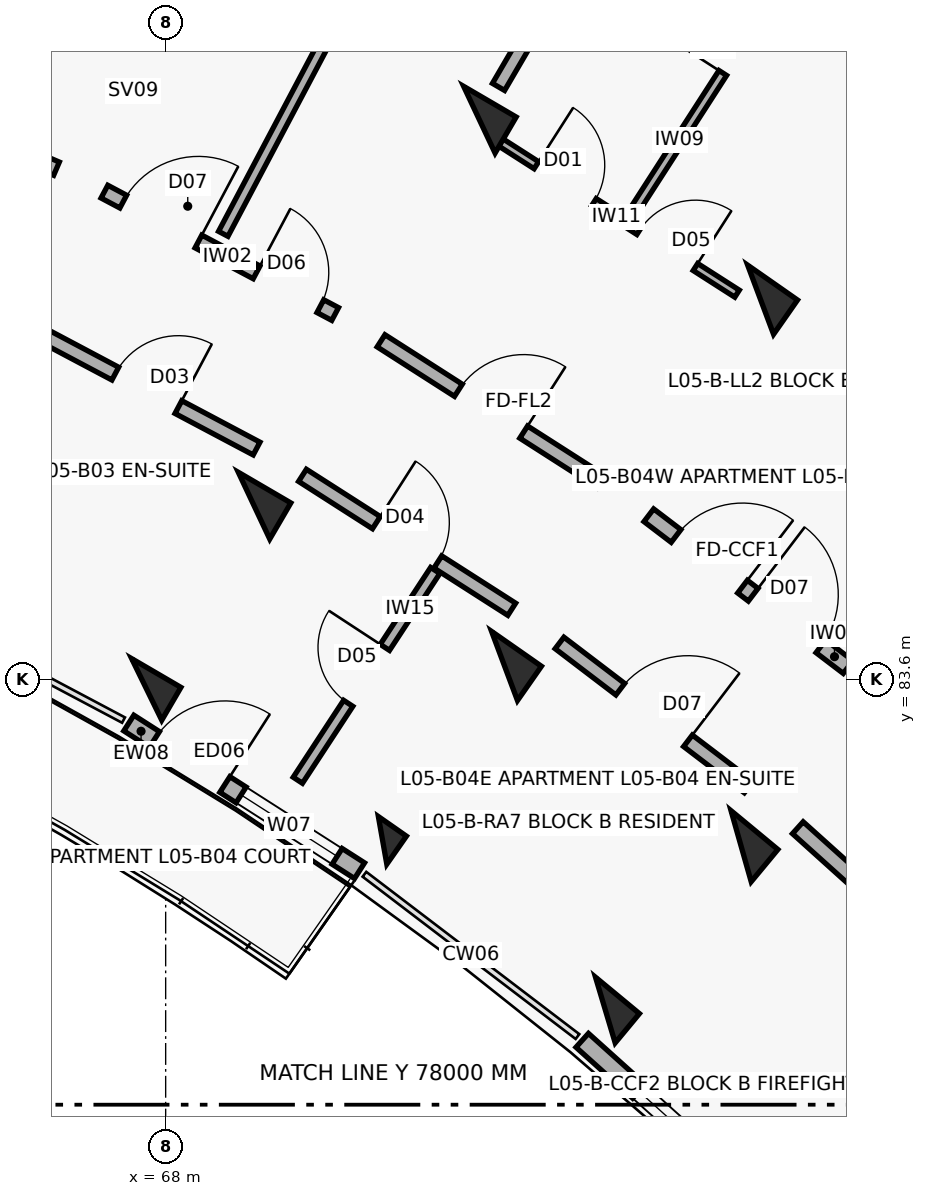
"""IFC4 building model, lengths in metres.
Left out: names, types, materials, properties, quantities, classifications, styles, units other than length and angle.
Written with IfcOpenShell. Run it as: python <this file> out.ifc"""

import sys

from ifc_helpers import new_model, si_unit, direction, frame, frame_2d, origin, origin_2d, place, context, subcontext, project, spatial, rectangle, extrude, element, fill, save


model = new_model("IFC4")
c1 = context("Model", 3, precision=1e-05, world=origin(), true_north=direction((0.0, 1.0)))
c2 = subcontext(c1, "Body", "Model", "MODEL_VIEW")
j1 = project(units=[si_unit("LENGTHUNIT", "METRE"), si_unit("PLANEANGLEUNIT", "RADIAN")], contexts=[c1])
p1 = place(None, origin())
s1 = spatial("IfcSite", under=j1, at=p1, CompositionType="ELEMENT")
p2 = place(p1, origin())
s2 = spatial("IfcBuilding", under=s1, at=p2, CompositionType="ELEMENT")
p3 = place(p2, frame((0.0, 0.0, 17.4)))
s3 = spatial("IfcBuildingStorey", under=s2, at=p3, CompositionType="ELEMENT", Elevation=17.4)
p4 = place(p3, frame((67.751, 83.464, 0.0), z_axis=(0.0, 0.0, 1.0), x_axis=(0.504226211181, 0.863571611366, 0.0)))
e1 = element("IfcColumn", 1, at=p4, inside=s3, PredefinedType="COLUMN", context=c2, shape_type="SweptSolid", body=[
    extrude(rectangle(XDim=0.5, YDim=0.75, at=origin_2d()), origin(), (0.0, 0.0, 1.0), 3.1),
])
for number, where, z_axis, x_axis in (
    (2, (69.163, 85.882, 0.0), (0.0, 0.0, 1.0), (0.504, 0.864, 0.0)),
    (3, (72.127, 90.96, 0.0), (0.0, 0.0, 1.0), (0.504, 0.864, 0.0)),
):
    element("IfcColumn", number, at=place(p3, frame(where, z_axis=z_axis, x_axis=x_axis)), inside=s3, PredefinedType="COLUMN", context=c2, shape_type="SweptSolid", body=[
        extrude(rectangle(XDim=0.55, YDim=0.8, at=origin_2d()), origin(), (0.0, 0.0, 1.0), 3.1),
    ])
p5 = place(p3, frame((70.854, 81.478, 0.0), z_axis=(0.0, 0.0, 1.0), x_axis=(0.573004420611, 0.819552276527, 0.0)))
e4 = element("IfcColumn", 4, at=p5, inside=s3, PredefinedType="COLUMN", context=c2, shape_type="SweptSolid", body=[
    extrude(rectangle(XDim=0.45, YDim=0.45, at=origin_2d()), origin(), (0.0, 0.0, 1.0), 3.1),
])
for number, where, z_axis, x_axis in (
    (5, (72.458, 83.773, 0.0), (0.0, 0.0, 1.0), (0.573, 0.82, 0.0)),
    (6, (75.828, 88.592, 0.0), (0.0, 0.0, 1.0), (0.573, 0.82, 0.0)),
):
    element("IfcColumn", number, at=place(p3, frame(where, z_axis=z_axis, x_axis=x_axis)), inside=s3, PredefinedType="COLUMN", context=c2, shape_type="SweptSolid", body=[
        extrude(rectangle(XDim=0.55, YDim=0.8, at=origin_2d()), origin(), (0.0, 0.0, 1.0), 3.1),
    ])
p6 = place(p3, frame((73.785, 79.245, 0.0), z_axis=(0.0, 0.0, 1.0), x_axis=(0.637961754089, 0.770068049148, 0.0)))
e7 = element("IfcColumn", 7, at=p6, inside=s3, PredefinedType="COLUMN", context=c2, shape_type="SweptSolid", body=[
    extrude(rectangle(XDim=0.5, YDim=0.75, at=origin_2d()), origin(), (0.0, 0.0, 1.0), 3.1),
])
p7 = place(p3, frame((75.571, 81.402, 0.0), z_axis=(0.0, 0.0, 1.0), x_axis=(0.637961754089, 0.770068049148, 0.0)))
e8 = element("IfcColumn", 8, at=p7, inside=s3, PredefinedType="COLUMN", context=c2, shape_type="SweptSolid", body=[
    extrude(rectangle(XDim=0.55, YDim=0.8, at=origin_2d()), origin(), (0.0, 0.0, 1.0), 3.1),
])
p8 = place(p3, frame((67.515, 83.022, 0.0), z_axis=(0.0, 0.0, 1.0), x_axis=(0.84225540507, -0.539078688718, 0.0)))
e9 = element("IfcWall", 9, at=p8, inside=s3, PredefinedType="SOLIDWALL", context=c2, shape_type="SweptSolid", body=[
    extrude(rectangle(XDim=3.604, YDim=0.245, at=frame_2d((1.802, 0.0))), origin(), (0.0, 0.0, 1.0), 2.25),
])
p9 = place(p8, frame((0.4, 0.0, 0.0)))
e10 = element("IfcOpeningElement", 10, at=p9, cuts=e9, PredefinedType="OPENING", context=c2, shape_type="SweptSolid", body=[
    extrude(rectangle(XDim=1.1, YDim=2.15, at=frame_2d((0.55, 1.075))), frame((0.0, 0.133, 0.0), z_axis=(0.0, -1.0, 0.0), x_axis=(1.0, 0.0, 0.0)), (0.0, 0.0, 1.0), 0.265),
])
p10 = place(p8, frame((1.754, 0.0, 0.35)))
e11 = element("IfcOpeningElement", 11, at=p10, cuts=e9, PredefinedType="OPENING", context=c2, shape_type="SweptSolid", body=[
    extrude(rectangle(XDim=1.5, YDim=1.65, at=frame_2d((0.75, 0.825))), frame((0.0, 0.133, 0.0), z_axis=(0.0, -1.0, 0.0), x_axis=(1.0, 0.0, 0.0)), (0.0, 0.0, 1.0), 0.265),
])
p11 = place(p3, frame((73.481, 78.847, 0.0), z_axis=(0.0, 0.0, 1.0), x_axis=(0.743385092197, -0.668863666751, 0.0)))
e12 = element("IfcWall", 12, at=p11, inside=s3, PredefinedType="SOLIDWALL", context=c2, shape_type="SweptSolid", body=[
    extrude(rectangle(XDim=3.604, YDim=0.245, at=frame_2d((1.802, 0.0))), origin(), (0.0, 0.0, 1.0), 2.25),
])
p12 = place(p11, frame((1.002, 0.0, 0.32)))
e13 = element("IfcOpeningElement", 13, at=p12, cuts=e12, PredefinedType="OPENING", context=c2, shape_type="SweptSolid", body=[
    extrude(rectangle(XDim=1.6, YDim=1.5, at=frame_2d((0.8, 0.75))), frame((0.0, 0.133, 0.0), z_axis=(0.0, -1.0, 0.0), x_axis=(1.0, 0.0, 0.0)), (0.0, 0.0, 1.0), 0.265),
])
p13 = place(p3, frame((63.407, 91.673, 0.0), z_axis=(0.0, 0.0, 1.0), x_axis=(0.918718172399, -0.394913813008, 0.0)))
e14 = element("IfcWall", 14, at=p13, inside=s3, PredefinedType="SOLIDWALL", context=c2, shape_type="SweptSolid", body=[
    extrude(rectangle(XDim=3.436, YDim=0.19, at=frame_2d((1.718, 0.0))), origin(), (0.0, 0.0, 1.0), 2.08),
])
p14 = place(p13, frame((1.208, 0.0, 0.0)))
e15 = element("IfcOpeningElement", 15, at=p14, cuts=e14, PredefinedType="OPENING", context=c2, shape_type="SweptSolid", body=[
    extrude(rectangle(XDim=1.02, YDim=2.15, at=frame_2d((0.51, 1.075))), frame((0.0, 0.105, 0.0), z_axis=(0.0, -1.0, 0.0), x_axis=(1.0, 0.0, 0.0)), (0.0, 0.0, 1.0), 0.21),
])
p15 = place(p3, frame((67.194, 90.014, 0.0), z_axis=(0.0, 0.0, 1.0), x_axis=(0.883410853063, -0.468599258099, 0.0)))
e16 = element("IfcWall", 16, at=p15, inside=s3, PredefinedType="SOLIDWALL", context=c2, shape_type="SweptSolid", body=[
    extrude(rectangle(XDim=3.436, YDim=0.19, at=frame_2d((1.718, 0.0))), origin(), (0.0, 0.0, 1.0), 2.08),
])
p16 = place(p15, frame((0.28, 0.0, 0.0)))
e17 = element("IfcOpeningElement", 17, at=p16, cuts=e16, PredefinedType="OPENING", context=c2, shape_type="SweptSolid", body=[
    extrude(rectangle(XDim=1.12, YDim=2.15, at=frame_2d((0.56, 1.075))), frame((0.0, 0.105, 0.0), z_axis=(0.0, -1.0, 0.0), x_axis=(1.0, 0.0, 0.0)), (0.0, 0.0, 1.0), 0.21),
])
p17 = place(p15, frame((2.266, 0.0, 0.0)))
e18 = element("IfcOpeningElement", 18, at=p17, cuts=e16, PredefinedType="OPENING", context=c2, shape_type="SweptSolid", body=[
    extrude(rectangle(XDim=0.95, YDim=2.1, at=frame_2d((0.475, 1.05))), frame((0.0, 0.105, 0.0), z_axis=(0.0, -1.0, 0.0), x_axis=(1.0, 0.0, 0.0)), (0.0, 0.0, 1.0), 0.21),
])
p18 = place(p3, frame((66.309, 88.165, 0.0), z_axis=(0.0, 0.0, 1.0), x_axis=(0.883444301944, -0.468536194293, 0.0)))
e19 = element("IfcWall", 19, at=p18, inside=s3, PredefinedType="SOLIDWALL", context=c2, shape_type="SweptSolid", body=[
    extrude(rectangle(XDim=3.269, YDim=0.19, at=frame_2d((1.634, 0.0))), origin(), (0.0, 0.0, 1.0), 2.08),
])
p19 = place(p18, frame((1.164, 0.0, 0.0)))
e20 = element("IfcOpeningElement", 20, at=p19, cuts=e19, PredefinedType="OPENING", context=c2, shape_type="SweptSolid", body=[
    extrude(rectangle(XDim=0.94, YDim=2.1, at=frame_2d((0.47, 1.05))), frame((0.0, 0.105, 0.0), z_axis=(0.0, -1.0, 0.0), x_axis=(1.0, 0.0, 0.0)), (0.0, 0.0, 1.0), 0.21),
])
p20 = place(p3, frame((68.758, 89.459, 0.0), z_axis=(0.0, 0.0, 1.0), x_axis=(0.467208910392, 0.884146952746, 0.0)))
e21 = element("IfcWall", 21, at=p20, inside=s3, PredefinedType="PARTITIONING", context=c2, shape_type="SweptSolid", body=[
    extrude(rectangle(XDim=7.95, YDim=0.14, at=frame_2d((3.975, 0.0))), origin(), (0.0, 0.0, 1.0), 2.08),
])
p21 = place(p20, frame((6.05, 0.0, 0.0)))
e22 = element("IfcOpeningElement", 22, at=p21, cuts=e21, PredefinedType="OPENING", context=c2, shape_type="SweptSolid", body=[
    extrude(rectangle(XDim=0.92, YDim=2.1, at=frame_2d((0.46, 1.05))), frame((0.0, 0.08, 0.0), z_axis=(0.0, -1.0, 0.0), x_axis=(1.0, 0.0, 0.0)), (0.0, 0.0, 1.0), 0.16),
])
p22 = place(p3, frame((70.834, 88.051, 0.0), z_axis=(0.0, 0.0, 1.0), x_axis=(0.842257205985, -0.539075874963, 0.0)))
e23 = element("IfcWall", 23, at=p22, inside=s3, PredefinedType="SOLIDWALL", context=c2, shape_type="SweptSolid", body=[
    extrude(rectangle(XDim=3.436, YDim=0.19, at=frame_2d((1.718, 0.0))), origin(), (0.0, 0.0, 1.0), 2.08),
])
p23 = place(p22, frame((1.208, 0.0, 0.0)))
e24 = element("IfcOpeningElement", 24, at=p23, cuts=e23, PredefinedType="OPENING", context=c2, shape_type="SweptSolid", body=[
    extrude(rectangle(XDim=1.02, YDim=2.15, at=frame_2d((0.51, 1.075))), frame((0.0, 0.105, 0.0), z_axis=(0.0, -1.0, 0.0), x_axis=(1.0, 0.0, 0.0)), (0.0, 0.0, 1.0), 0.21),
])
p24 = place(p3, frame((69.8, 86.281, 0.0), z_axis=(0.0, 0.0, 1.0), x_axis=(0.842225276846, -0.539125758095, 0.0)))
e25 = element("IfcWall", 25, at=p24, inside=s3, PredefinedType="SOLIDWALL", context=c2, shape_type="SweptSolid", body=[
    extrude(rectangle(XDim=3.269, YDim=0.19, at=frame_2d((1.634, 0.0))), origin(), (0.0, 0.0, 1.0), 2.08),
])
p25 = place(p24, frame((1.154, 0.0, 0.0)))
e26 = element("IfcOpeningElement", 26, at=p25, cuts=e25, PredefinedType="OPENING", context=c2, shape_type="SweptSolid", body=[
    extrude(rectangle(XDim=0.96, YDim=2.1, at=frame_2d((0.48, 1.05))), frame((0.0, 0.105, 0.0), z_axis=(0.0, -1.0, 0.0), x_axis=(1.0, 0.0, 0.0)), (0.0, 0.0, 1.0), 0.21),
])
p26 = place(p3, frame((69.739, 82.269, 0.0), z_axis=(0.0, 0.0, 1.0), x_axis=(0.547920940513, 0.836530120765, 0.0)))
e27 = element("IfcWall", 27, at=p26, inside=s3, PredefinedType="PARTITIONING", context=c2, shape_type="SweptSolid", body=[
    extrude(rectangle(XDim=3.3, YDim=0.145, at=frame_2d((1.65, 0.0))), origin(), (0.0, 0.0, 1.0), 2.08),
])
p27 = place(p26, frame((1.21, 0.0, 0.0)))
e28 = element("IfcOpeningElement", 28, at=p27, cuts=e27, PredefinedType="OPENING", context=c2, shape_type="SweptSolid", body=[
    extrude(rectangle(XDim=0.88, YDim=2.1, at=frame_2d((0.44, 1.05))), frame((0.0, 0.083, 0.0), z_axis=(0.0, -1.0, 0.0), x_axis=(1.0, 0.0, 0.0)), (0.0, 0.0, 1.0), 0.165),
])
p28 = place(p3, frame((72.33, 90.712, 0.0), z_axis=(0.0, 0.0, 1.0), x_axis=(0.842245628842, -0.539093962771, 0.0)))
e29 = element("IfcWall", 29, at=p28, inside=s3, PredefinedType="PARTITIONING", context=c2, shape_type="SweptSolid", body=[
    extrude(rectangle(XDim=3.785, YDim=0.11, at=frame_2d((1.893, 0.0))), origin(), (0.0, 0.0, 1.0), 2.08),
])
p29 = place(p28, frame((0.65, 0.0, 0.0)))
e30 = element("IfcOpeningElement", 30, at=p29, cuts=e29, PredefinedType="OPENING", context=c2, shape_type="SweptSolid", body=[
    extrude(rectangle(XDim=0.9, YDim=2.1, at=frame_2d((0.45, 1.05))), frame((0.0, 0.065, 0.0), z_axis=(0.0, -1.0, 0.0), x_axis=(1.0, 0.0, 0.0)), (0.0, 0.0, 1.0), 0.13),
])
p30 = place(p28, frame((2.255, 0.0, 0.0)))
e31 = element("IfcOpeningElement", 31, at=p30, cuts=e29, PredefinedType="OPENING", context=c2, shape_type="SweptSolid", body=[
    extrude(rectangle(XDim=0.88, YDim=2.1, at=frame_2d((0.44, 1.05))), frame((0.0, 0.065, 0.0), z_axis=(0.0, -1.0, 0.0), x_axis=(1.0, 0.0, 0.0)), (0.0, 0.0, 1.0), 0.13),
])
p31 = place(p3, frame((74.192, 89.81, 0.0), z_axis=(0.0, 0.0, 1.0), x_axis=(0.541612517702, 0.840628265447, 0.0)))
e32 = element("IfcWall", 32, at=p31, inside=s3, PredefinedType="PARTITIONING", context=c2, shape_type="SweptSolid", body=[
    extrude(rectangle(XDim=5.05, YDim=0.12, at=frame_2d((2.525, 0.0))), origin(), (0.0, 0.0, 1.0), 2.08),
])
p32 = place(p31, frame((2.1, 0.0, 0.0)))
e33 = element("IfcOpeningElement", 33, at=p32, cuts=e32, PredefinedType="OPENING", context=c2, shape_type="SweptSolid", body=[
    extrude(rectangle(XDim=0.85, YDim=2.1, at=frame_2d((0.425, 1.05))), frame((0.0, 0.07, 0.0), z_axis=(0.0, -1.0, 0.0), x_axis=(1.0, 0.0, 0.0)), (0.0, 0.0, 1.0), 0.14),
])
p33 = place(p3, frame((72.379, 91.392, 0.0), z_axis=(0.0, 0.0, 1.0), x_axis=(0.504216452091, 0.863577309475, 0.0)))
e34 = element("IfcWall", 34, at=p33, inside=s3, PredefinedType="SOLIDWALL", context=c2, shape_type="SweptSolid", body=[
    extrude(rectangle(XDim=4.35, YDim=0.185, at=frame_2d((2.175, 0.0))), origin(), (0.0, 0.0, 1.0), 2.08),
])
p34 = place(p3, frame((74.357, 85.756, 0.0), z_axis=(0.0, 0.0, 1.0), x_axis=(0.795498026433, -0.605956178235, 0.0)))
e35 = element("IfcWall", 35, at=p34, inside=s3, PredefinedType="SOLIDWALL", context=c2, shape_type="SweptSolid", body=[
    extrude(rectangle(XDim=3.296, YDim=0.21, at=frame_2d((1.648, 0.0))), origin(), (0.0, 0.0, 1.0), 2.08),
])
p35 = place(p34, frame((0.45, 0.0, 0.0)))
e36 = element("IfcOpeningElement", 36, at=p35, cuts=e35, PredefinedType="OPENING", context=c2, shape_type="SweptSolid", body=[
    extrude(rectangle(XDim=1.1, YDim=2.15, at=frame_2d((0.55, 1.075))), frame((0.0, 0.115, 0.0), z_axis=(0.0, -1.0, 0.0), x_axis=(1.0, 0.0, 0.0)), (0.0, 0.0, 1.0), 0.23),
])
p36 = place(p34, frame((1.726, 0.0, 0.0)))
e37 = element("IfcOpeningElement", 37, at=p36, cuts=e35, PredefinedType="OPENING", context=c2, shape_type="SweptSolid", body=[
    extrude(rectangle(XDim=1.12, YDim=2.15, at=frame_2d((0.56, 1.075))), frame((0.0, 0.115, 0.0), z_axis=(0.0, -1.0, 0.0), x_axis=(1.0, 0.0, 0.0)), (0.0, 0.0, 1.0), 0.23),
])
p37 = place(p3, frame((73.182, 84.076, 0.0), z_axis=(0.0, 0.0, 1.0), x_axis=(0.795501577908, -0.605951515838, 0.0)))
e38 = element("IfcWall", 38, at=p37, inside=s3, PredefinedType="SOLIDWALL", context=c2, shape_type="SweptSolid", body=[
    extrude(rectangle(XDim=3.129, YDim=0.19, at=frame_2d((1.564, 0.0))), origin(), (0.0, 0.0, 1.0), 2.08),
])
p38 = place(p37, frame((1.004, 0.0, 0.0)))
e39 = element("IfcOpeningElement", 39, at=p38, cuts=e38, PredefinedType="OPENING", context=c2, shape_type="SweptSolid", body=[
    extrude(rectangle(XDim=1.12, YDim=2.15, at=frame_2d((0.56, 1.075))), frame((0.0, 0.105, 0.0), z_axis=(0.0, -1.0, 0.0), x_axis=(1.0, 0.0, 0.0)), (0.0, 0.0, 1.0), 0.21),
])
p39 = place(p3, frame((76.317, 81.644, 0.0), z_axis=(0.0, 0.0, 1.0), x_axis=(0.743387266925, -0.668861249718, 0.0)))
e40 = element("IfcWall", 40, at=p39, inside=s3, PredefinedType="SOLIDWALL", context=c2, shape_type="SweptSolid", body=[
    extrude(rectangle(XDim=3.128, YDim=0.21, at=frame_2d((1.564, 0.0))), origin(), (0.0, 0.0, 1.0), 2.08),
])
p40 = place(p39, frame((1.014, 0.0, 0.0)))
e41 = element("IfcOpeningElement", 41, at=p40, cuts=e40, PredefinedType="OPENING", context=c2, shape_type="SweptSolid", body=[
    extrude(rectangle(XDim=1.1, YDim=2.15, at=frame_2d((0.55, 1.075))), frame((0.0, 0.115, 0.0), z_axis=(0.0, -1.0, 0.0), x_axis=(1.0, 0.0, 0.0)), (0.0, 0.0, 1.0), 0.23),
])
p41 = place(p9, origin())
e42 = element("IfcDoor", 42, at=p41, inside=s3, OperationType="SINGLE_SWING_RIGHT", PredefinedType="DOOR", context=c2, shape_type="SweptSolid", body=[
    extrude(rectangle(XDim=1.1, YDim=2.15, at=frame_2d((0.55, 1.075))), frame((0.0, 0.025, 0.0), z_axis=(0.0, -1.0, 0.0), x_axis=(1.0, 0.0, 0.0)), (0.0, 0.0, 1.0), 0.05),
])
fill(e10, e42)
p42 = place(p10, origin())
e43 = element("IfcWindow", 43, at=p42, inside=s3, PartitioningType="DOUBLE_PANEL_VERTICAL", PredefinedType="WINDOW", context=c2, shape_type="SweptSolid", body=[
    extrude(rectangle(XDim=1.5, YDim=1.65, at=frame_2d((0.75, 0.825))), frame((0.0, 0.03, 0.0), z_axis=(0.0, -1.0, 0.0), x_axis=(1.0, 0.0, 0.0)), (0.0, 0.0, 1.0), 0.06),
])
fill(e11, e43)
p43 = place(p12, origin())
e44 = element("IfcWindow", 44, at=p43, inside=s3, PartitioningType="DOUBLE_PANEL_VERTICAL", PredefinedType="WINDOW", context=c2, shape_type="SweptSolid", body=[
    extrude(rectangle(XDim=1.6, YDim=1.5, at=frame_2d((0.8, 0.75))), frame((0.0, 0.03, 0.0), z_axis=(0.0, -1.0, 0.0), x_axis=(1.0, 0.0, 0.0)), (0.0, 0.0, 1.0), 0.06),
])
fill(e13, e44)
p44 = place(p16, origin())
e45 = element("IfcDoor", 45, at=p44, inside=s3, OperationType="SINGLE_SWING_RIGHT", PredefinedType="DOOR", context=c2, shape_type="SweptSolid", body=[
    extrude(rectangle(XDim=1.12, YDim=2.15, at=frame_2d((0.56, 1.075))), frame((0.0, 0.025, 0.0), z_axis=(0.0, -1.0, 0.0), x_axis=(1.0, 0.0, 0.0)), (0.0, 0.0, 1.0), 0.05),
])
fill(e17, e45)
p45 = place(p17, origin())
e46 = element("IfcDoor", 46, at=p45, inside=s3, OperationType="SINGLE_SWING_LEFT", PredefinedType="DOOR", context=c2, shape_type="SweptSolid", body=[
    extrude(rectangle(XDim=0.95, YDim=2.1, at=frame_2d((0.475, 1.05))), frame((0.0, 0.025, 0.0), z_axis=(0.0, -1.0, 0.0), x_axis=(1.0, 0.0, 0.0)), (0.0, 0.0, 1.0), 0.05),
])
fill(e18, e46)
p46 = place(p19, origin())
e47 = element("IfcDoor", 47, at=p46, inside=s3, OperationType="SINGLE_SWING_RIGHT", PredefinedType="DOOR", context=c2, shape_type="SweptSolid", body=[
    extrude(rectangle(XDim=0.94, YDim=2.1, at=frame_2d((0.47, 1.05))), frame((0.0, 0.025, 0.0), z_axis=(0.0, -1.0, 0.0), x_axis=(1.0, 0.0, 0.0)), (0.0, 0.0, 1.0), 0.05),
])
fill(e20, e47)
p47 = place(p23, origin())
e48 = element("IfcDoor", 48, at=p47, inside=s3, OperationType="SINGLE_SWING_RIGHT", PredefinedType="DOOR", context=c2, shape_type="SweptSolid", body=[
    extrude(rectangle(XDim=1.02, YDim=2.15, at=frame_2d((0.51, 1.075))), frame((0.0, 0.025, 0.0), z_axis=(0.0, -1.0, 0.0), x_axis=(1.0, 0.0, 0.0)), (0.0, 0.0, 1.0), 0.05),
])
fill(e24, e48)
p48 = place(p25, origin())
e49 = element("IfcDoor", 49, at=p48, inside=s3, OperationType="SINGLE_SWING_LEFT", PredefinedType="DOOR", context=c2, shape_type="SweptSolid", body=[
    extrude(rectangle(XDim=0.96, YDim=2.1, at=frame_2d((0.48, 1.05))), frame((0.0, 0.025, 0.0), z_axis=(0.0, -1.0, 0.0), x_axis=(1.0, 0.0, 0.0)), (0.0, 0.0, 1.0), 0.05),
])
fill(e26, e49)
p49 = place(p27, origin())
e50 = element("IfcDoor", 50, at=p49, inside=s3, OperationType="SINGLE_SWING_RIGHT", PredefinedType="DOOR", context=c2, shape_type="SweptSolid", body=[
    extrude(rectangle(XDim=0.88, YDim=2.1, at=frame_2d((0.44, 1.05))), frame((0.0, 0.025, 0.0), z_axis=(0.0, -1.0, 0.0), x_axis=(1.0, 0.0, 0.0)), (0.0, 0.0, 1.0), 0.05),
])
fill(e28, e50)
p50 = place(p29, origin())
e51 = element("IfcDoor", 51, at=p50, inside=s3, OperationType="SINGLE_SWING_LEFT", PredefinedType="DOOR", context=c2, shape_type="SweptSolid", body=[
    extrude(rectangle(XDim=0.9, YDim=2.1, at=frame_2d((0.45, 1.05))), frame((0.0, 0.025, 0.0), z_axis=(0.0, -1.0, 0.0), x_axis=(1.0, 0.0, 0.0)), (0.0, 0.0, 1.0), 0.05),
])
fill(e30, e51)
p51 = place(p30, origin())
e52 = element("IfcDoor", 52, at=p51, inside=s3, OperationType="SINGLE_SWING_RIGHT", PredefinedType="DOOR", context=c2, shape_type="SweptSolid", body=[
    extrude(rectangle(XDim=0.88, YDim=2.1, at=frame_2d((0.44, 1.05))), frame((0.0, 0.025, 0.0), z_axis=(0.0, -1.0, 0.0), x_axis=(1.0, 0.0, 0.0)), (0.0, 0.0, 1.0), 0.05),
])
fill(e31, e52)
p52 = place(p32, origin())
e53 = element("IfcDoor", 53, at=p52, inside=s3, OperationType="SINGLE_SWING_LEFT", PredefinedType="DOOR", context=c2, shape_type="SweptSolid", body=[
    extrude(rectangle(XDim=0.85, YDim=2.1, at=frame_2d((0.425, 1.05))), frame((0.0, 0.025, 0.0), z_axis=(0.0, -1.0, 0.0), x_axis=(1.0, 0.0, 0.0)), (0.0, 0.0, 1.0), 0.05),
])
fill(e33, e53)
p53 = place(p35, origin())
e54 = element("IfcDoor", 54, at=p53, inside=s3, OperationType="SINGLE_SWING_RIGHT", PredefinedType="DOOR", context=c2, shape_type="SweptSolid", body=[
    extrude(rectangle(XDim=1.1, YDim=2.15, at=frame_2d((0.55, 1.075))), frame((0.0, 0.025, 0.0), z_axis=(0.0, -1.0, 0.0), x_axis=(1.0, 0.0, 0.0)), (0.0, 0.0, 1.0), 0.05),
])
fill(e36, e54)
p54 = place(p36, origin())
e55 = element("IfcDoor", 55, at=p54, inside=s3, OperationType="SINGLE_SWING_LEFT", PredefinedType="DOOR", context=c2, shape_type="SweptSolid", body=[
    extrude(rectangle(XDim=1.12, YDim=2.15, at=frame_2d((0.56, 1.075))), frame((0.0, 0.025, 0.0), z_axis=(0.0, -1.0, 0.0), x_axis=(1.0, 0.0, 0.0)), (0.0, 0.0, 1.0), 0.05),
])
fill(e37, e55)
p55 = place(p38, origin())
e56 = element("IfcDoor", 56, at=p55, inside=s3, OperationType="SINGLE_SWING_RIGHT", PredefinedType="DOOR", context=c2, shape_type="SweptSolid", body=[
    extrude(rectangle(XDim=1.12, YDim=2.15, at=frame_2d((0.56, 1.075))), frame((0.0, 0.025, 0.0), z_axis=(0.0, -1.0, 0.0), x_axis=(1.0, 0.0, 0.0)), (0.0, 0.0, 1.0), 0.05),
])
fill(e39, e56)
save(model, sys.argv[1])
